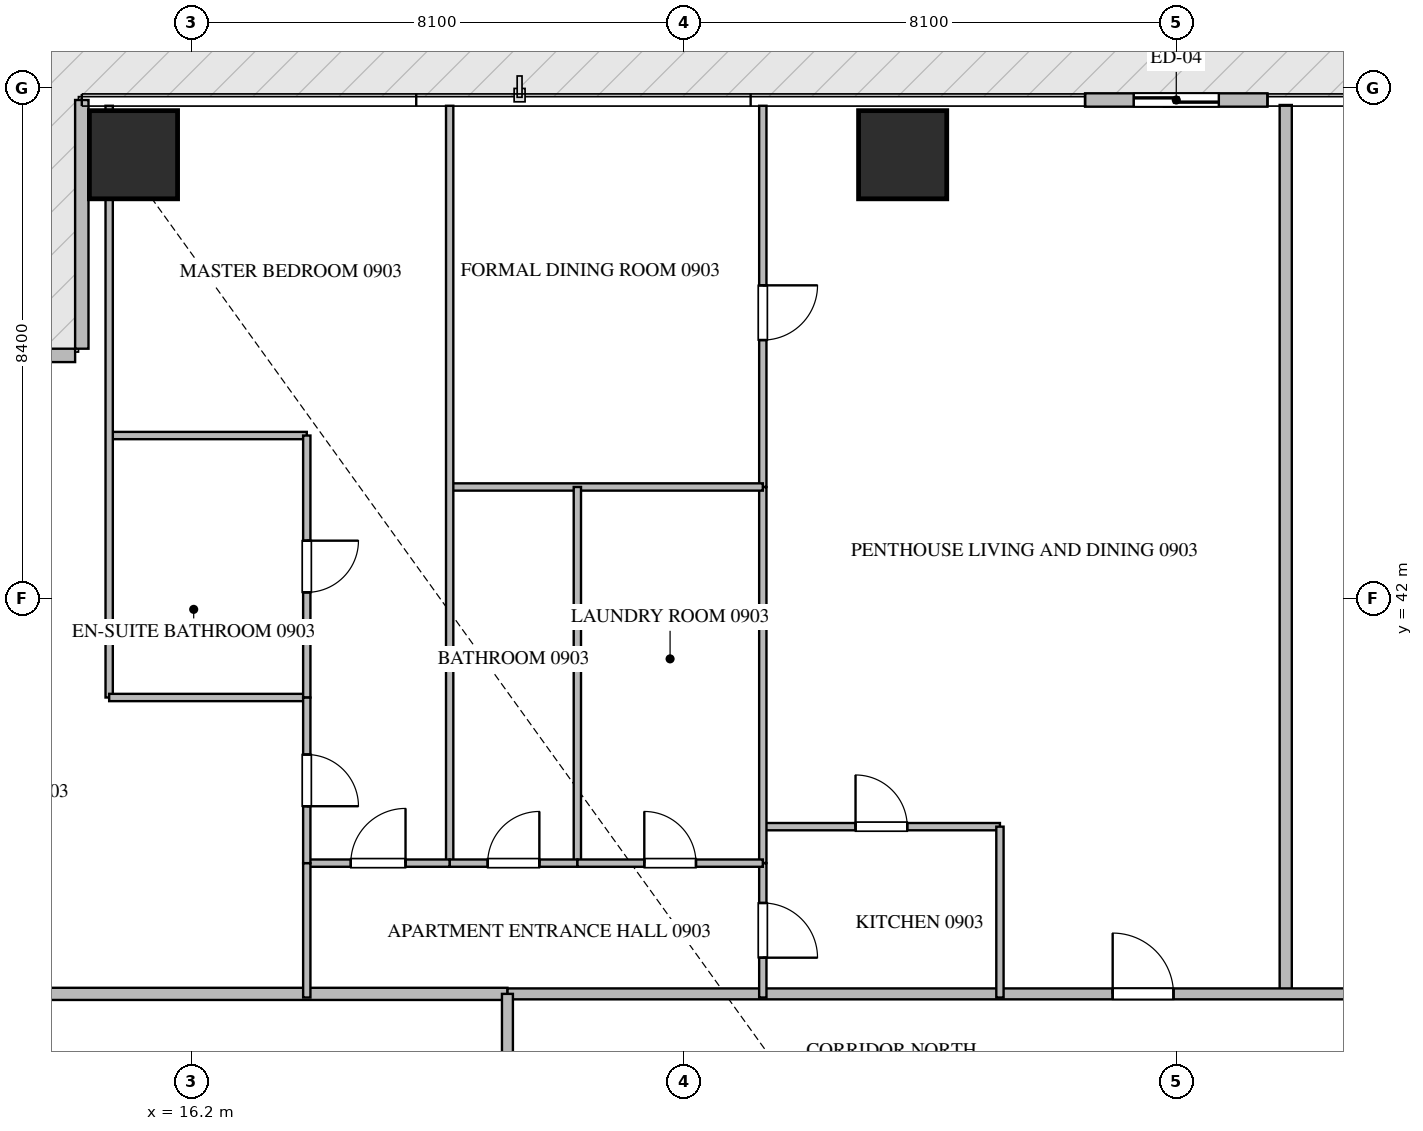
"""IFC4 building model, lengths in metres.
Left out: names, types, materials, properties, quantities, classifications, styles, units other than length and angle.
Written with IfcOpenShell. Run it as: python <this file> out.ifc"""

import sys

from ifc_helpers import new_model, si_unit, direction, frame, frame_2d, origin, origin_2d, place, context, subcontext, project, spatial, rectangle, extrude, source, transform, mapped, element, fill, save


model = new_model("IFC4")
c1 = context("Model", 3, precision=1e-05, world=origin(), true_north=direction((0.0, 1.0)))
c2 = subcontext(c1, "Body", "Model", "MODEL_VIEW")
j1 = project(units=[si_unit("LENGTHUNIT", "METRE"), si_unit("PLANEANGLEUNIT", "RADIAN")], contexts=[c1])
p1 = place(None, origin())
s1 = spatial("IfcSite", under=j1, at=p1, CompositionType="ELEMENT")
p2 = place(p1, origin())
s2 = spatial("IfcBuilding", under=s1, at=p2, CompositionType="ELEMENT")
p3 = place(p2, frame((0.0, 0.0, 41.7)))
s3 = spatial("IfcBuildingStorey", under=s2, at=p3, CompositionType="ELEMENT", Elevation=41.7)
m1 = source(origin(), c2, "Body", "SweptSolid", [
    extrude(rectangle(XDim=1.45, YDim=1.45, at=origin_2d()), origin(), (0.0, 0.0, 1.0), 3.75),
])
for number, where, z_axis, x_axis in (
    (1, (15.25, 49.3, -0.26), (0.0, 0.0, 1.0), (1.0, 0.0, 0.0)),
    (2, (27.9, 49.3, -0.26), (0.0, 0.0, 1.0), (1.0, 0.0, 0.0)),
):
    element("IfcColumn", number, at=place(p3, frame(where, z_axis=z_axis, x_axis=x_axis)), inside=s3, PredefinedType="COLUMN", context=c2, shape_type="MappedRepresentation", body=[
        mapped(m1, transform((0.0, 0.0, 0.0), scale=1.0)),
    ])
p4 = place(p3, frame((33.9, 50.2, 0.0), z_axis=(0.0, 0.0, 1.0), x_axis=(-1.0, 0.0, 0.0)))
e3 = element("IfcWall", 3, at=p4, inside=s3, PredefinedType="ELEMENTEDWALL", context=c2, shape_type="SweptSolid", body=[
    extrude(rectangle(XDim=3.0, YDim=0.22, at=frame_2d((1.5, 0.0))), origin(), (0.0, 0.0, 1.0), 3.475),
])
p5 = place(p4, frame((0.8, 0.0, 0.0)))
e4 = element("IfcOpeningElement", 4, at=p5, cuts=e3, PredefinedType="OPENING", context=c2, shape_type="SweptSolid", body=[
    extrude(rectangle(XDim=1.4, YDim=2.25, at=frame_2d((0.7, 1.125))), frame((0.0, 0.12, 0.0), z_axis=(0.0, -1.0, 0.0), x_axis=(1.0, 0.0, 0.0)), (0.0, 0.0, 1.0), 0.24),
])
p6 = place(p3, frame((14.4, 50.2, 0.0), z_axis=(0.0, 0.0, 1.0), x_axis=(0.0, -1.0, 0.0)))
e5 = element("IfcWall", 5, at=p6, inside=s3, PredefinedType="ELEMENTEDWALL", context=c2, shape_type="SweptSolid", body=[
    extrude(rectangle(XDim=4.09, YDim=0.22, at=frame_2d((2.045, 0.0))), origin(), (0.0, 0.0, 1.0), 3.475),
])
p7 = place(p3, frame((14.29, 46.0, 0.0), z_axis=(0.0, 0.0, 1.0), x_axis=(-1.0, 0.0, 0.0)))
e6 = element("IfcWall", 6, at=p7, inside=s3, PredefinedType="ELEMENTEDWALL", context=c2, shape_type="SweptSolid", body=[
    extrude(rectangle(XDim=3.98, YDim=0.22, at=frame_2d((1.99, 0.0))), origin(), (0.0, 0.0, 1.0), 3.475),
])
p8 = place(p7, frame((1.19, 0.0, 0.65)))
e7 = element("IfcOpeningElement", 7, at=p8, cuts=e6, PredefinedType="OPENING", context=c2, shape_type="SweptSolid", body=[
    extrude(rectangle(XDim=1.6, YDim=2.1, at=frame_2d((0.8, 1.05))), frame((0.0, 0.12, 0.0), z_axis=(0.0, -1.0, 0.0), x_axis=(1.0, 0.0, 0.0)), (0.0, 0.0, 1.0), 0.24),
])
p9 = place(p3, frame((34.2, 35.5, 0.0), z_axis=(0.0, 0.0, 1.0), x_axis=(0.0, 1.0, 0.0)))
e8 = element("IfcWall", 8, at=p9, inside=s3, PredefinedType="PARTITIONING", context=c2, shape_type="SweptSolid", body=[
    extrude(rectangle(XDim=14.618, YDim=0.2, at=frame_2d((7.309, 0.0))), origin(), (0.0, 0.0, 1.0), 3.49),
])
p10 = place(p3, frame((6.082, 35.5, 0.0), z_axis=(0.0, 0.0, 1.0), x_axis=(1.0, 0.0, 0.0)))
e9 = element("IfcWall", 9, at=p10, inside=s3, PredefinedType="PARTITIONING", context=c2, shape_type="SweptSolid", body=[
    extrude(rectangle(XDim=15.318, YDim=0.2, at=frame_2d((7.659, 0.0))), origin(), (0.0, 0.0, 1.0), 3.49),
])
p11 = place(p3, frame((21.402, 35.5, 0.0), z_axis=(0.0, 0.0, 1.0), x_axis=(1.0, 0.0, 0.0)))
e10 = element("IfcWall", 10, at=p11, inside=s3, PredefinedType="PARTITIONING", context=c2, shape_type="SweptSolid", body=[
    extrude(rectangle(XDim=21.996, YDim=0.18, at=frame_2d((10.998, 0.0))), origin(), (0.0, 0.0, 1.0), 3.49),
])
p12 = place(p11, frame((9.952, 0.0, 0.0)))
e11 = element("IfcOpeningElement", 11, at=p12, cuts=e10, PredefinedType="OPENING", context=c2, shape_type="SweptSolid", body=[
    extrude(rectangle(XDim=1.0, YDim=2.15, at=frame_2d((0.5, 1.075))), frame((0.0, 0.1, 0.0), z_axis=(0.0, -1.0, 0.0), x_axis=(1.0, 0.0, 0.0)), (0.0, 0.0, 1.0), 0.2),
])
p13 = place(p11, frame((15.18, 0.0, 0.0)))
e12 = element("IfcOpeningElement", 12, at=p13, cuts=e10, PredefinedType="OPENING", context=c2, shape_type="SweptSolid", body=[
    extrude(rectangle(XDim=1.0, YDim=2.15, at=frame_2d((0.5, 1.075))), frame((0.0, 0.1, 0.0), z_axis=(0.0, -1.0, 0.0), x_axis=(1.0, 0.0, 0.0)), (0.0, 0.0, 1.0), 0.2),
])
p14 = place(p3, frame((21.4, 14.9, 0.0), z_axis=(0.0, 0.0, 1.0), x_axis=(0.0, 1.0, 0.0)))
e13 = element("IfcWall", 13, at=p14, inside=s3, PredefinedType="PARTITIONING", context=c2, shape_type="SweptSolid", body=[
    extrude(rectangle(XDim=20.6, YDim=0.18, at=frame_2d((10.3, 0.0))), origin(), (0.0, 0.0, 1.0), 3.49),
])
p15 = place(p14, frame((17.64, 0.0, 0.0)))
e14 = element("IfcOpeningElement", 14, at=p15, cuts=e13, PredefinedType="OPENING", context=c2, shape_type="SweptSolid", body=[
    extrude(rectangle(XDim=1.0, YDim=2.15, at=frame_2d((0.5, 1.075))), frame((0.0, 0.1, 0.0), z_axis=(0.0, -1.0, 0.0), x_axis=(1.0, 0.0, 0.0)), (0.0, 0.0, 1.0), 0.2),
])
p16 = place(p3, frame((25.6, 38.25, 0.0), z_axis=(0.0, 0.0, 1.0), x_axis=(1.0, 0.0, 0.0)))
e15 = element("IfcWall", 15, at=p16, inside=s3, PredefinedType="PARTITIONING", context=c2, shape_type="SweptSolid", body=[
    extrude(rectangle(XDim=3.9, YDim=0.12, at=frame_2d((1.95, 0.0))), origin(), (0.0, 0.0, 1.0), 3.49),
])
p17 = place(p16, frame((1.525, 0.0, 0.0)))
e16 = element("IfcOpeningElement", 16, at=p17, cuts=e15, PredefinedType="OPENING", context=c2, shape_type="SweptSolid", body=[
    extrude(rectangle(XDim=0.85, YDim=2.1, at=frame_2d((0.425, 1.05))), frame((0.0, 0.07, 0.0), z_axis=(0.0, -1.0, 0.0), x_axis=(1.0, 0.0, 0.0)), (0.0, 0.0, 1.0), 0.14),
])
p18 = place(p3, frame((29.5, 38.25, 0.0), z_axis=(0.0, 0.0, 1.0), x_axis=(0.0, -1.0, 0.0)))
e17 = element("IfcWall", 17, at=p18, inside=s3, PredefinedType="PARTITIONING", context=c2, shape_type="SweptSolid", body=[
    extrude(rectangle(XDim=2.81, YDim=0.12, at=frame_2d((1.405, 0.0))), origin(), (0.0, 0.0, 1.0), 3.49),
])
p19 = place(p3, frame((25.6, 37.65, 0.0), z_axis=(0.0, 0.0, 1.0), x_axis=(0.0, -1.0, 0.0)))
e18 = element("IfcWall", 18, at=p19, inside=s3, PredefinedType="PARTITIONING", context=c2, shape_type="SweptSolid", body=[
    extrude(rectangle(XDim=2.21, YDim=0.12, at=frame_2d((1.105, 0.0))), origin(), (0.0, 0.0, 1.0), 3.49),
])
p20 = place(p19, frame((0.655, 0.0, 0.0)))
e19 = element("IfcOpeningElement", 19, at=p20, cuts=e18, PredefinedType="OPENING", context=c2, shape_type="SweptSolid", body=[
    extrude(rectangle(XDim=0.9, YDim=2.1, at=frame_2d((0.45, 1.05))), frame((0.0, 0.07, 0.0), z_axis=(0.0, -1.0, 0.0), x_axis=(1.0, 0.0, 0.0)), (0.0, 0.0, 1.0), 0.14),
])
p21 = place(p3, frame((25.6, 50.105, 0.0), z_axis=(0.0, 0.0, 1.0), x_axis=(0.0, -1.0, 0.0)))
e20 = element("IfcWall", 20, at=p21, inside=s3, PredefinedType="PARTITIONING", context=c2, shape_type="SweptSolid", body=[
    extrude(rectangle(XDim=6.269, YDim=0.12, at=frame_2d((3.135, 0.0))), origin(), (0.0, 0.0, 1.0), 3.49),
])
p22 = place(p21, frame((2.953, 0.0, 0.0)))
e21 = element("IfcOpeningElement", 21, at=p22, cuts=e20, PredefinedType="OPENING", context=c2, shape_type="SweptSolid", body=[
    extrude(rectangle(XDim=0.9, YDim=2.1, at=frame_2d((0.45, 1.05))), frame((0.0, 0.07, 0.0), z_axis=(0.0, -1.0, 0.0), x_axis=(1.0, 0.0, 0.0)), (0.0, 0.0, 1.0), 0.14),
])
p23 = place(p3, frame((25.6, 43.834, 0.0), z_axis=(0.0, 0.0, 1.0), x_axis=(0.0, -1.0, 0.0)))
e22 = element("IfcWall", 22, at=p23, inside=s3, PredefinedType="PARTITIONING", context=c2, shape_type="SweptSolid", body=[
    extrude(rectangle(XDim=6.182, YDim=0.12, at=frame_2d((3.091, 0.0))), origin(), (0.0, 0.0, 1.0), 3.49),
])
p24 = place(p3, frame((20.45, 43.836, 0.0), z_axis=(0.0, 0.0, 1.0), x_axis=(1.0, 0.0, 0.0)))
e23 = element("IfcWall", 23, at=p24, inside=s3, PredefinedType="PARTITIONING", context=c2, shape_type="SweptSolid", body=[
    extrude(rectangle(XDim=5.15, YDim=0.12, at=frame_2d((2.575, 0.0))), origin(), (0.0, 0.0, 1.0), 3.49),
])
p25 = place(p3, frame((20.45, 50.105, 0.0), z_axis=(0.0, 0.0, 1.0), x_axis=(0.0, -1.0, 0.0)))
e24 = element("IfcWall", 24, at=p25, inside=s3, PredefinedType="PARTITIONING", context=c2, shape_type="SweptSolid", body=[
    extrude(rectangle(XDim=12.455, YDim=0.12, at=frame_2d((6.228, 0.0))), origin(), (0.0, 0.0, 1.0), 3.49),
])
p26 = place(p3, frame((22.55, 43.836, 0.0), z_axis=(0.0, 0.0, 1.0), x_axis=(0.0, -1.0, 0.0)))
e25 = element("IfcWall", 25, at=p26, inside=s3, PredefinedType="PARTITIONING", context=c2, shape_type="SweptSolid", body=[
    extrude(rectangle(XDim=6.186, YDim=0.12, at=frame_2d((3.093, 0.0))), origin(), (0.0, 0.0, 1.0), 3.49),
])
p27 = place(p3, frame((20.45, 37.65, 0.0), z_axis=(0.0, 0.0, 1.0), x_axis=(1.0, 0.0, 0.0)))
e26 = element("IfcWall", 26, at=p27, inside=s3, PredefinedType="PARTITIONING", context=c2, shape_type="SweptSolid", body=[
    extrude(rectangle(XDim=2.1, YDim=0.12, at=frame_2d((1.05, 0.0))), origin(), (0.0, 0.0, 1.0), 3.49),
])
p28 = place(p27, frame((0.625, 0.0, 0.0)))
e27 = element("IfcOpeningElement", 27, at=p28, cuts=e26, PredefinedType="OPENING", context=c2, shape_type="SweptSolid", body=[
    extrude(rectangle(XDim=0.85, YDim=2.1, at=frame_2d((0.425, 1.05))), frame((0.0, 0.07, 0.0), z_axis=(0.0, -1.0, 0.0), x_axis=(1.0, 0.0, 0.0)), (0.0, 0.0, 1.0), 0.14),
])
p29 = place(p3, frame((22.552, 37.65, 0.0), z_axis=(0.0, 0.0, 1.0), x_axis=(1.0, 0.0, 0.0)))
e28 = element("IfcWall", 28, at=p29, inside=s3, PredefinedType="PARTITIONING", context=c2, shape_type="SweptSolid", body=[
    extrude(rectangle(XDim=3.048, YDim=0.12, at=frame_2d((1.524, 0.0))), origin(), (0.0, 0.0, 1.0), 3.49),
])
p30 = place(p29, frame((1.099, 0.0, 0.0)))
e29 = element("IfcOpeningElement", 29, at=p30, cuts=e28, PredefinedType="OPENING", context=c2, shape_type="SweptSolid", body=[
    extrude(rectangle(XDim=0.85, YDim=2.1, at=frame_2d((0.425, 1.05))), frame((0.0, 0.07, 0.0), z_axis=(0.0, -1.0, 0.0), x_axis=(1.0, 0.0, 0.0)), (0.0, 0.0, 1.0), 0.14),
])
p31 = place(p3, frame((18.1, 37.65, 0.0), z_axis=(0.0, 0.0, 1.0), x_axis=(1.0, 0.0, 0.0)))
e30 = element("IfcWall", 30, at=p31, inside=s3, PredefinedType="PARTITIONING", context=c2, shape_type="SweptSolid", body=[
    extrude(rectangle(XDim=2.348, YDim=0.12, at=frame_2d((1.174, 0.0))), origin(), (0.0, 0.0, 1.0), 3.49),
])
p32 = place(p31, frame((0.724, 0.0, 0.0)))
e31 = element("IfcOpeningElement", 31, at=p32, cuts=e30, PredefinedType="OPENING", context=c2, shape_type="SweptSolid", body=[
    extrude(rectangle(XDim=0.9, YDim=2.1, at=frame_2d((0.45, 1.05))), frame((0.0, 0.07, 0.0), z_axis=(0.0, -1.0, 0.0), x_axis=(1.0, 0.0, 0.0)), (0.0, 0.0, 1.0), 0.14),
])
p33 = place(p3, frame((14.85, 44.682, 0.0), z_axis=(0.0, 0.0, 1.0), x_axis=(1.0, 0.0, 0.0)))
e32 = element("IfcWall", 32, at=p33, inside=s3, PredefinedType="PARTITIONING", context=c2, shape_type="SweptSolid", body=[
    extrude(rectangle(XDim=3.25, YDim=0.12, at=frame_2d((1.625, 0.0))), origin(), (0.0, 0.0, 1.0), 3.49),
])
p34 = place(p3, frame((14.85, 50.105, 0.0), z_axis=(0.0, 0.0, 1.0), x_axis=(0.0, -1.0, 0.0)))
e33 = element("IfcWall", 33, at=p34, inside=s3, PredefinedType="PARTITIONING", context=c2, shape_type="SweptSolid", body=[
    extrude(rectangle(XDim=9.731, YDim=0.12, at=frame_2d((4.865, 0.0))), origin(), (0.0, 0.0, 1.0), 3.49),
])
p35 = place(p3, frame((14.85, 40.374, 0.0), z_axis=(0.0, 0.0, 1.0), x_axis=(1.0, 0.0, 0.0)))
e34 = element("IfcWall", 34, at=p35, inside=s3, PredefinedType="PARTITIONING", context=c2, shape_type="SweptSolid", body=[
    extrude(rectangle(XDim=3.25, YDim=0.12, at=frame_2d((1.625, 0.0))), origin(), (0.0, 0.0, 1.0), 3.49),
])
p36 = place(p3, frame((18.1, 44.682, 0.0), z_axis=(0.0, 0.0, 1.0), x_axis=(0.0, -1.0, 0.0)))
e35 = element("IfcWall", 35, at=p36, inside=s3, PredefinedType="PARTITIONING", context=c2, shape_type="SweptSolid", body=[
    extrude(rectangle(XDim=4.308, YDim=0.12, at=frame_2d((2.154, 0.0))), origin(), (0.0, 0.0, 1.0), 3.49),
])
p37 = place(p36, frame((1.729, 0.0, 0.0)))
e36 = element("IfcOpeningElement", 36, at=p37, cuts=e35, PredefinedType="OPENING", context=c2, shape_type="SweptSolid", body=[
    extrude(rectangle(XDim=0.85, YDim=2.1, at=frame_2d((0.425, 1.05))), frame((0.0, 0.07, 0.0), z_axis=(0.0, -1.0, 0.0), x_axis=(1.0, 0.0, 0.0)), (0.0, 0.0, 1.0), 0.14),
])
p38 = place(p3, frame((18.1, 40.372, 0.0), z_axis=(0.0, 0.0, 1.0), x_axis=(0.0, -1.0, 0.0)))
e37 = element("IfcWall", 37, at=p38, inside=s3, PredefinedType="PARTITIONING", context=c2, shape_type="SweptSolid", body=[
    extrude(rectangle(XDim=2.722, YDim=0.12, at=frame_2d((1.361, 0.0))), origin(), (0.0, 0.0, 1.0), 3.49),
])
p39 = place(p38, frame((0.936, 0.0, 0.0)))
e38 = element("IfcOpeningElement", 38, at=p39, cuts=e37, PredefinedType="OPENING", context=c2, shape_type="SweptSolid", body=[
    extrude(rectangle(XDim=0.85, YDim=2.1, at=frame_2d((0.425, 1.05))), frame((0.0, 0.07, 0.0), z_axis=(0.0, -1.0, 0.0), x_axis=(1.0, 0.0, 0.0)), (0.0, 0.0, 1.0), 0.14),
])
p40 = place(p3, frame((18.1, 37.648, 0.0), z_axis=(0.0, 0.0, 1.0), x_axis=(0.0, -1.0, 0.0)))
e39 = element("IfcWall", 39, at=p40, inside=s3, PredefinedType="PARTITIONING", context=c2, shape_type="SweptSolid", body=[
    extrude(rectangle(XDim=2.208, YDim=0.12, at=frame_2d((1.104, 0.0))), origin(), (0.0, 0.0, 1.0), 3.49),
])
m2 = source(origin(), c2, "Body", "SweptSolid", [
    extrude(rectangle(XDim=1.4, YDim=2.25, at=frame_2d((0.7, 1.125))), frame((0.0, 0.025, 0.0), z_axis=(0.0, -1.0, 0.0), x_axis=(1.0, 0.0, 0.0)), (0.0, 0.0, 1.0), 0.05),
])
p41 = place(p5, origin())
e40 = element("IfcDoor", 40, at=p41, inside=s3, OperationType="SLIDING_TO_LEFT", PredefinedType="DOOR", context=c2, shape_type="MappedRepresentation", body=[
    mapped(m2, transform((0.0, 0.0, 0.0), scale=1.0)),
])
fill(e4, e40)
m3 = source(origin(), c2, "Body", "SweptSolid", [
    extrude(rectangle(XDim=1.0, YDim=2.15, at=frame_2d((0.5, 1.075))), frame((0.0, 0.025, 0.0), z_axis=(0.0, -1.0, 0.0), x_axis=(1.0, 0.0, 0.0)), (0.0, 0.0, 1.0), 0.05),
])
p42 = place(p12, origin())
e41 = element("IfcDoor", 41, at=p42, inside=s3, OperationType="SINGLE_SWING_LEFT", PredefinedType="DOOR", context=c2, shape_type="MappedRepresentation", body=[
    mapped(m3, transform((0.0, 0.0, 0.0), scale=1.0)),
])
fill(e11, e41)
m4 = source(origin(), c2, "Body", "SweptSolid", [
    extrude(rectangle(XDim=0.85, YDim=2.1, at=frame_2d((0.425, 1.05))), frame((0.0, 0.025, 0.0), z_axis=(0.0, -1.0, 0.0), x_axis=(1.0, 0.0, 0.0)), (0.0, 0.0, 1.0), 0.05),
])
p43 = place(p17, origin())
e42 = element("IfcDoor", 42, at=p43, inside=s3, OperationType="SINGLE_SWING_LEFT", PredefinedType="DOOR", context=c2, shape_type="MappedRepresentation", body=[
    mapped(m4, transform((0.0, 0.0, 0.0), scale=1.0)),
])
fill(e16, e42)
m5 = source(origin(), c2, "Body", "SweptSolid", [
    extrude(rectangle(XDim=0.9, YDim=2.1, at=frame_2d((0.45, 1.05))), frame((0.0, 0.025, 0.0), z_axis=(0.0, -1.0, 0.0), x_axis=(1.0, 0.0, 0.0)), (0.0, 0.0, 1.0), 0.05),
])
p44 = place(p20, origin())
e43 = element("IfcDoor", 43, at=p44, inside=s3, OperationType="SINGLE_SWING_RIGHT", PredefinedType="DOOR", context=c2, shape_type="MappedRepresentation", body=[
    mapped(m5, transform((0.0, 0.0, 0.0), scale=1.0)),
])
fill(e19, e43)
p45 = place(p22, origin())
e44 = element("IfcDoor", 44, at=p45, inside=s3, OperationType="SINGLE_SWING_LEFT", PredefinedType="DOOR", context=c2, shape_type="MappedRepresentation", body=[
    mapped(m5, transform((0.0, 0.0, 0.0), scale=1.0)),
])
fill(e21, e44)
p46 = place(p28, origin())
e45 = element("IfcDoor", 45, at=p46, inside=s3, OperationType="SINGLE_SWING_RIGHT", PredefinedType="DOOR", context=c2, shape_type="MappedRepresentation", body=[
    mapped(m4, transform((0.0, 0.0, 0.0), scale=1.0)),
])
fill(e27, e45)
p47 = place(p30, origin())
e46 = element("IfcDoor", 46, at=p47, inside=s3, OperationType="SINGLE_SWING_LEFT", PredefinedType="DOOR", context=c2, shape_type="MappedRepresentation", body=[
    mapped(m4, transform((0.0, 0.0, 0.0), scale=1.0)),
])
fill(e29, e46)
p48 = place(p32, origin())
e47 = element("IfcDoor", 47, at=p48, inside=s3, OperationType="SINGLE_SWING_RIGHT", PredefinedType="DOOR", context=c2, shape_type="MappedRepresentation", body=[
    mapped(m5, transform((0.0, 0.0, 0.0), scale=1.0)),
])
fill(e31, e47)
p49 = place(p37, origin())
e48 = element("IfcDoor", 48, at=p49, inside=s3, OperationType="SINGLE_SWING_LEFT", PredefinedType="DOOR", context=c2, shape_type="MappedRepresentation", body=[
    mapped(m4, transform((0.0, 0.0, 0.0), scale=1.0)),
])
fill(e36, e48)
p50 = place(p39, origin())
e49 = element("IfcDoor", 49, at=p50, inside=s3, OperationType="SINGLE_SWING_RIGHT", PredefinedType="DOOR", context=c2, shape_type="MappedRepresentation", body=[
    mapped(m4, transform((0.0, 0.0, 0.0), scale=1.0)),
])
fill(e38, e49)
save(model, sys.argv[1])
